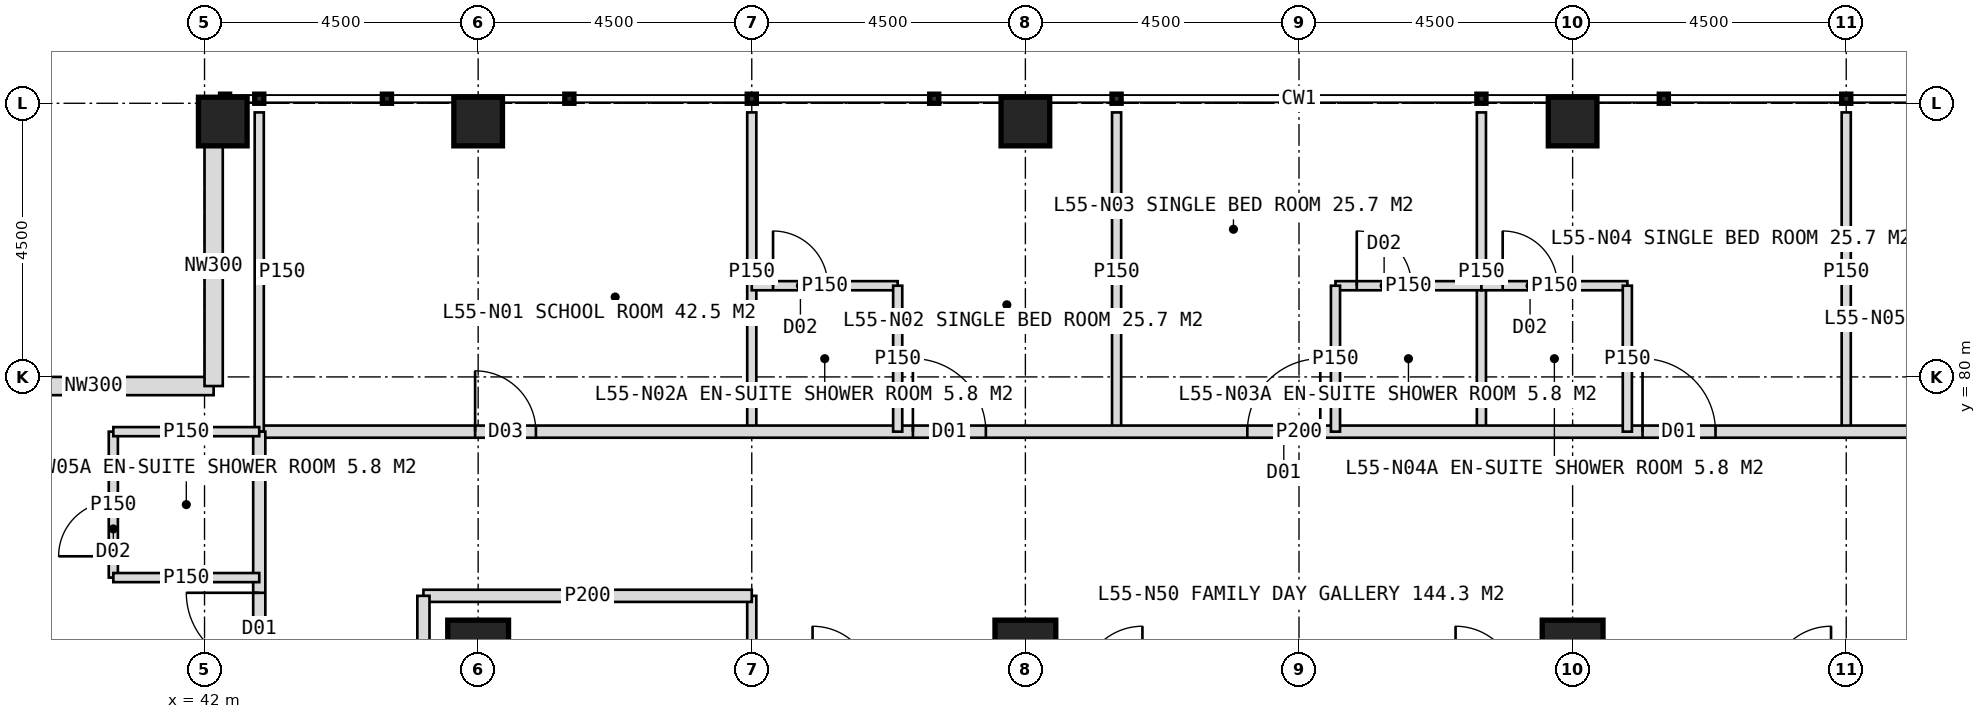
"""IFC4 building model, lengths in metres.
Left out: names, types, materials, properties, quantities, classifications, styles, units other than length and angle.
Written with IfcOpenShell. Run it as: python <this file> out.ifc"""

import sys

from ifc_helpers import new_model, si_unit, direction, frame, frame_2d, origin, origin_2d, place, context, subcontext, project, spatial, rectangle, hollow_rectangle, extrude, element, fill, save


model = new_model("IFC4")
c1 = context("Model", 3, precision=1e-05, world=origin(), true_north=direction((0.0, 1.0)))
c2 = subcontext(c1, "Body", "Model", "MODEL_VIEW")
j1 = project(units=[si_unit("LENGTHUNIT", "METRE"), si_unit("PLANEANGLEUNIT", "RADIAN")], contexts=[c1])
p1 = place(None, origin())
s1 = spatial("IfcSite", under=j1, at=p1, CompositionType="ELEMENT")
p2 = place(p1, origin())
s2 = spatial("IfcBuilding", under=s1, at=p2, CompositionType="ELEMENT")
p3 = place(p2, frame((0.0, 0.0, 229.0)))
s3 = spatial("IfcBuildingStorey", under=s2, at=p3, CompositionType="ELEMENT", Elevation=229.0)
for number, where, z_axis, x_axis in (
    (1, (46.5, 75.5, 0.0), (0.0, 0.0, 1.0), (1.0, 0.0, 0.0)),
    (2, (55.5, 75.5, 0.0), (0.0, 0.0, 1.0), (1.0, 0.0, 0.0)),
    (3, (64.5, 75.5, 0.0), (0.0, 0.0, 1.0), (1.0, 0.0, 0.0)),
):
    element("IfcColumn", number, at=place(p3, frame(where, z_axis=z_axis, x_axis=x_axis)), inside=s3, PredefinedType="COLUMN", context=c2, shape_type="SweptSolid", body=[
        extrude(hollow_rectangle(XDim=1.0, YDim=1.0, WallThickness=0.1, at=origin_2d()), origin(), (0.0, 0.0, 1.0), 4.0),
    ])
for number, where, z_axis, x_axis in (
    (4, (42.3, 84.2, 0.0), (0.0, 0.0, 1.0), (1.0, 0.0, 0.0)),
    (5, (46.5, 84.2, 0.0), (0.0, 0.0, 1.0), (1.0, 0.0, 0.0)),
    (6, (55.5, 84.2, 0.0), (0.0, 0.0, 1.0), (1.0, 0.0, 0.0)),
    (7, (64.5, 84.2, 0.0), (0.0, 0.0, 1.0), (1.0, 0.0, 0.0)),
):
    element("IfcColumn", number, at=place(p3, frame(where, z_axis=z_axis, x_axis=x_axis)), inside=s3, PredefinedType="COLUMN", context=c2, shape_type="SweptSolid", body=[
        extrude(hollow_rectangle(XDim=0.8, YDim=0.8, WallThickness=0.08, at=origin_2d()), origin(), (0.0, 0.0, 1.0), 4.0),
    ])
for number, where, z_axis, x_axis in (
    (8, (38.2, 79.85, 0.0), (0.0, 0.0, 1.0), (1.0, 0.0, 0.0)),
    (9, (42.15, 79.85, 0.0), (0.0, 0.0, 1.0), (0.0, 1.0, 0.0)),
):
    element("IfcWall", number, at=place(p3, frame(where, z_axis=z_axis, x_axis=x_axis)), inside=s3, PredefinedType="ELEMENTEDWALL", context=c2, shape_type="SweptSolid", body=[
        extrude(rectangle(XDim=3.95, YDim=0.3, at=frame_2d((1.975, 0.0))), origin(), (0.0, 0.0, 1.0), 2.85),
    ])
for number, where, z_axis, x_axis in (
    (10, (51.0, 79.1, 0.0), (0.0, 0.0, 1.0), (0.0, 1.0, 0.0)),
    (11, (57.0, 79.1, 0.0), (0.0, 0.0, 1.0), (0.0, 1.0, 0.0)),
    (12, (63.0, 79.1, 0.0), (0.0, 0.0, 1.0), (0.0, 1.0, 0.0)),
    (13, (69.0, 79.1, 0.0), (0.0, 0.0, 1.0), (0.0, 1.0, 0.0)),
):
    element("IfcWall", number, at=place(p3, frame(where, z_axis=z_axis, x_axis=x_axis)), inside=s3, PredefinedType="PARTITIONING", context=c2, shape_type="SweptSolid", body=[
        extrude(rectangle(XDim=5.25, YDim=0.15, at=frame_2d((2.625, 0.0))), origin(), (0.0, 0.0, 1.0), 3.75),
    ])
p4 = place(p3, frame((42.9, 79.1, 0.0), z_axis=(0.0, 0.0, 1.0), x_axis=(1.0, 0.0, 0.0)))
e14 = element("IfcWall", 14, at=p4, inside=s3, PredefinedType="PARTITIONING", context=c2, shape_type="SweptSolid", body=[
    extrude(rectangle(XDim=34.2, YDim=0.2, at=frame_2d((17.1, 0.0))), origin(), (0.0, 0.0, 1.0), 3.75),
])
p5 = place(p4, frame((3.55, 0.0, 0.0)))
e15 = element("IfcOpeningElement", 15, at=p5, cuts=e14, PredefinedType="OPENING", context=c2, shape_type="SweptSolid", body=[
    extrude(rectangle(XDim=1.0, YDim=2.1, at=frame_2d((0.5, 1.05))), frame((0.0, 0.11, 0.0), z_axis=(0.0, -1.0, 0.0), x_axis=(1.0, 0.0, 0.0)), (0.0, 0.0, 1.0), 0.22),
])
p6 = place(p4, frame((10.75, 0.0, 0.0)))
e16 = element("IfcOpeningElement", 16, at=p6, cuts=e14, PredefinedType="OPENING", context=c2, shape_type="SweptSolid", body=[
    extrude(rectangle(XDim=1.2, YDim=2.2, at=frame_2d((0.6, 1.1))), frame((0.0, 0.11, 0.0), z_axis=(0.0, -1.0, 0.0), x_axis=(1.0, 0.0, 0.0)), (0.0, 0.0, 1.0), 0.22),
])
p7 = place(p4, frame((16.25, 0.0, 0.0)))
e17 = element("IfcOpeningElement", 17, at=p7, cuts=e14, PredefinedType="OPENING", context=c2, shape_type="SweptSolid", body=[
    extrude(rectangle(XDim=1.2, YDim=2.2, at=frame_2d((0.6, 1.1))), frame((0.0, 0.11, 0.0), z_axis=(0.0, -1.0, 0.0), x_axis=(1.0, 0.0, 0.0)), (0.0, 0.0, 1.0), 0.22),
])
p8 = place(p4, frame((22.75, 0.0, 0.0)))
e18 = element("IfcOpeningElement", 18, at=p8, cuts=e14, PredefinedType="OPENING", context=c2, shape_type="SweptSolid", body=[
    extrude(rectangle(XDim=1.2, YDim=2.2, at=frame_2d((0.6, 1.1))), frame((0.0, 0.11, 0.0), z_axis=(0.0, -1.0, 0.0), x_axis=(1.0, 0.0, 0.0)), (0.0, 0.0, 1.0), 0.22),
])
p9 = place(p4, frame((29.75, 0.0, 0.0)))
e19 = element("IfcOpeningElement", 19, at=p9, cuts=e14, PredefinedType="OPENING", context=c2, shape_type="SweptSolid", body=[
    extrude(rectangle(XDim=1.2, YDim=2.2, at=frame_2d((0.6, 1.1))), frame((0.0, 0.11, 0.0), z_axis=(0.0, -1.0, 0.0), x_axis=(1.0, 0.0, 0.0)), (0.0, 0.0, 1.0), 0.22),
])
p10 = place(p3, frame((42.9, 79.1, 0.0), z_axis=(0.0, 0.0, 1.0), x_axis=(0.0, 1.0, 0.0)))
e20 = element("IfcWall", 20, at=p10, inside=s3, PredefinedType="PARTITIONING", context=c2, shape_type="SweptSolid", body=[
    extrude(rectangle(XDim=5.25, YDim=0.15, at=frame_2d((2.625, 0.0))), origin(), (0.0, 0.0, 1.0), 3.75),
])
p11 = place(p3, frame((51.0, 81.5, 0.0), z_axis=(0.0, 0.0, 1.0), x_axis=(1.0, 0.0, 0.0)))
e21 = element("IfcWall", 21, at=p11, inside=s3, PredefinedType="PARTITIONING", context=c2, shape_type="SweptSolid", body=[
    extrude(rectangle(XDim=2.4, YDim=0.15, at=frame_2d((1.2, 0.0))), origin(), (0.0, 0.0, 1.0), 3.75),
])
p12 = place(p11, frame((0.35, 0.0, 0.0)))
e22 = element("IfcOpeningElement", 22, at=p12, cuts=e21, PredefinedType="OPENING", context=c2, shape_type="SweptSolid", body=[
    extrude(rectangle(XDim=0.9, YDim=2.1, at=frame_2d((0.45, 1.05))), frame((0.0, 0.085, 0.0), z_axis=(0.0, -1.0, 0.0), x_axis=(1.0, 0.0, 0.0)), (0.0, 0.0, 1.0), 0.17),
])
p13 = place(p3, frame((53.4, 79.1, 0.0), z_axis=(0.0, 0.0, 1.0), x_axis=(0.0, 1.0, 0.0)))
e23 = element("IfcWall", 23, at=p13, inside=s3, PredefinedType="PARTITIONING", context=c2, shape_type="SweptSolid", body=[
    extrude(rectangle(XDim=2.4, YDim=0.15, at=frame_2d((1.2, 0.0))), origin(), (0.0, 0.0, 1.0), 3.75),
])
p14 = place(p3, frame((60.6, 81.5, 0.0), z_axis=(0.0, 0.0, 1.0), x_axis=(1.0, 0.0, 0.0)))
e24 = element("IfcWall", 24, at=p14, inside=s3, PredefinedType="PARTITIONING", context=c2, shape_type="SweptSolid", body=[
    extrude(rectangle(XDim=2.4, YDim=0.15, at=frame_2d((1.2, 0.0))), origin(), (0.0, 0.0, 1.0), 3.75),
])
p15 = place(p14, frame((0.35, 0.0, 0.0)))
e25 = element("IfcOpeningElement", 25, at=p15, cuts=e24, PredefinedType="OPENING", context=c2, shape_type="SweptSolid", body=[
    extrude(rectangle(XDim=0.9, YDim=2.1, at=frame_2d((0.45, 1.05))), frame((0.0, 0.085, 0.0), z_axis=(0.0, -1.0, 0.0), x_axis=(1.0, 0.0, 0.0)), (0.0, 0.0, 1.0), 0.17),
])
p16 = place(p3, frame((60.6, 79.1, 0.0), z_axis=(0.0, 0.0, 1.0), x_axis=(0.0, 1.0, 0.0)))
e26 = element("IfcWall", 26, at=p16, inside=s3, PredefinedType="PARTITIONING", context=c2, shape_type="SweptSolid", body=[
    extrude(rectangle(XDim=2.4, YDim=0.15, at=frame_2d((1.2, 0.0))), origin(), (0.0, 0.0, 1.0), 3.75),
])
p17 = place(p3, frame((63.0, 81.5, 0.0), z_axis=(0.0, 0.0, 1.0), x_axis=(1.0, 0.0, 0.0)))
e27 = element("IfcWall", 27, at=p17, inside=s3, PredefinedType="PARTITIONING", context=c2, shape_type="SweptSolid", body=[
    extrude(rectangle(XDim=2.4, YDim=0.15, at=frame_2d((1.2, 0.0))), origin(), (0.0, 0.0, 1.0), 3.75),
])
p18 = place(p17, frame((0.35, 0.0, 0.0)))
e28 = element("IfcOpeningElement", 28, at=p18, cuts=e27, PredefinedType="OPENING", context=c2, shape_type="SweptSolid", body=[
    extrude(rectangle(XDim=0.9, YDim=2.1, at=frame_2d((0.45, 1.05))), frame((0.0, 0.085, 0.0), z_axis=(0.0, -1.0, 0.0), x_axis=(1.0, 0.0, 0.0)), (0.0, 0.0, 1.0), 0.17),
])
p19 = place(p3, frame((65.4, 79.1, 0.0), z_axis=(0.0, 0.0, 1.0), x_axis=(0.0, 1.0, 0.0)))
e29 = element("IfcWall", 29, at=p19, inside=s3, PredefinedType="PARTITIONING", context=c2, shape_type="SweptSolid", body=[
    extrude(rectangle(XDim=2.4, YDim=0.15, at=frame_2d((1.2, 0.0))), origin(), (0.0, 0.0, 1.0), 3.75),
])
p20 = place(p3, frame((51.0, 71.0, 0.0), z_axis=(0.0, 0.0, 1.0), x_axis=(0.0, 1.0, 0.0)))
e30 = element("IfcWall", 30, at=p20, inside=s3, PredefinedType="PARTITIONING", context=c2, shape_type="SweptSolid", body=[
    extrude(rectangle(XDim=5.4, YDim=0.15, at=frame_2d((2.7, 0.0))), origin(), (0.0, 0.0, 1.0), 3.75),
])
p21 = place(p3, frame((45.6, 76.4, 0.0), z_axis=(0.0, 0.0, 1.0), x_axis=(1.0, 0.0, 0.0)))
e31 = element("IfcWall", 31, at=p21, inside=s3, PredefinedType="PARTITIONING", context=c2, shape_type="SweptSolid", body=[
    extrude(rectangle(XDim=5.4, YDim=0.2, at=frame_2d((2.7, 0.0))), origin(), (0.0, 0.0, 1.0), 3.75),
])
p22 = place(p3, frame((42.9, 44.9, 0.0), z_axis=(0.0, 0.0, 1.0), x_axis=(0.0, 1.0, 0.0)))
e32 = element("IfcWall", 32, at=p22, inside=s3, PredefinedType="PARTITIONING", context=c2, shape_type="SweptSolid", body=[
    extrude(rectangle(XDim=34.2, YDim=0.2, at=frame_2d((17.1, 0.0))), origin(), (0.0, 0.0, 1.0), 3.75),
])
p23 = place(p22, frame((1.25, 0.0, 0.0)))
e33 = element("IfcOpeningElement", 33, at=p23, cuts=e32, PredefinedType="OPENING", context=c2, shape_type="SweptSolid", body=[
    extrude(rectangle(XDim=1.2, YDim=2.2, at=frame_2d((0.6, 1.1))), frame((0.0, 0.11, 0.0), z_axis=(0.0, -1.0, 0.0), x_axis=(1.0, 0.0, 0.0)), (0.0, 0.0, 1.0), 0.22),
])
p24 = place(p22, frame((7.75, 0.0, 0.0)))
e34 = element("IfcOpeningElement", 34, at=p24, cuts=e32, PredefinedType="OPENING", context=c2, shape_type="SweptSolid", body=[
    extrude(rectangle(XDim=1.2, YDim=2.2, at=frame_2d((0.6, 1.1))), frame((0.0, 0.11, 0.0), z_axis=(0.0, -1.0, 0.0), x_axis=(1.0, 0.0, 0.0)), (0.0, 0.0, 1.0), 0.22),
])
p25 = place(p22, frame((13.6, 0.0, 0.0)))
e35 = element("IfcOpeningElement", 35, at=p25, cuts=e32, PredefinedType="OPENING", context=c2, shape_type="SweptSolid", body=[
    extrude(rectangle(XDim=1.0, YDim=2.1, at=frame_2d((0.5, 1.05))), frame((0.0, 0.11, 0.0), z_axis=(0.0, -1.0, 0.0), x_axis=(1.0, 0.0, 0.0)), (0.0, 0.0, 1.0), 0.22),
])
p26 = place(p22, frame((19.75, 0.0, 0.0)))
e36 = element("IfcOpeningElement", 36, at=p26, cuts=e32, PredefinedType="OPENING", context=c2, shape_type="SweptSolid", body=[
    extrude(rectangle(XDim=1.2, YDim=2.2, at=frame_2d((0.6, 1.1))), frame((0.0, 0.11, 0.0), z_axis=(0.0, -1.0, 0.0), x_axis=(1.0, 0.0, 0.0)), (0.0, 0.0, 1.0), 0.22),
])
p27 = place(p22, frame((30.35, 0.0, 0.0)))
e37 = element("IfcOpeningElement", 37, at=p27, cuts=e32, PredefinedType="OPENING", context=c2, shape_type="SweptSolid", body=[
    extrude(rectangle(XDim=1.2, YDim=2.2, at=frame_2d((0.6, 1.1))), frame((0.0, 0.11, 0.0), z_axis=(0.0, -1.0, 0.0), x_axis=(1.0, 0.0, 0.0)), (0.0, 0.0, 1.0), 0.22),
])
p28 = place(p3, frame((40.5, 76.7, 0.0), z_axis=(0.0, 0.0, 1.0), x_axis=(0.0, 1.0, 0.0)))
e38 = element("IfcWall", 38, at=p28, inside=s3, PredefinedType="PARTITIONING", context=c2, shape_type="SweptSolid", body=[
    extrude(rectangle(XDim=2.4, YDim=0.15, at=frame_2d((1.2, 0.0))), origin(), (0.0, 0.0, 1.0), 3.75),
])
p29 = place(p28, frame((0.35, 0.0, 0.0)))
e39 = element("IfcOpeningElement", 39, at=p29, cuts=e38, PredefinedType="OPENING", context=c2, shape_type="SweptSolid", body=[
    extrude(rectangle(XDim=0.9, YDim=2.1, at=frame_2d((0.45, 1.05))), frame((0.0, 0.085, 0.0), z_axis=(0.0, -1.0, 0.0), x_axis=(1.0, 0.0, 0.0)), (0.0, 0.0, 1.0), 0.17),
])
for number, where, z_axis, x_axis in (
    (40, (42.9, 76.7, 0.0), (0.0, 0.0, 1.0), (-1.0, 0.0, 0.0)),
    (41, (42.9, 79.1, 0.0), (0.0, 0.0, 1.0), (-1.0, 0.0, 0.0)),
):
    element("IfcWall", number, at=place(p3, frame(where, z_axis=z_axis, x_axis=x_axis)), inside=s3, PredefinedType="PARTITIONING", context=c2, shape_type="SweptSolid", body=[
        extrude(rectangle(XDim=2.4, YDim=0.15, at=frame_2d((1.2, 0.0))), origin(), (0.0, 0.0, 1.0), 3.75),
    ])
p30 = place(p3, frame((45.6, 62.0, 0.0), z_axis=(0.0, 0.0, 1.0), x_axis=(0.0, 1.0, 0.0)))
e42 = element("IfcWall", 42, at=p30, inside=s3, PredefinedType="PARTITIONING", context=c2, shape_type="SweptSolid", body=[
    extrude(rectangle(XDim=14.4, YDim=0.2, at=frame_2d((7.2, 0.0))), origin(), (0.0, 0.0, 1.0), 3.75),
])
p31 = place(p30, frame((2.5, 0.0, 0.0)))
e43 = element("IfcOpeningElement", 43, at=p31, cuts=e42, PredefinedType="OPENING", context=c2, shape_type="SweptSolid", body=[
    extrude(rectangle(XDim=1.0, YDim=2.1, at=frame_2d((0.5, 1.05))), frame((0.0, 0.11, 0.0), z_axis=(0.0, -1.0, 0.0), x_axis=(1.0, 0.0, 0.0)), (0.0, 0.0, 1.0), 0.22),
])
p32 = place(p30, frame((7.0, 0.0, 0.0)))
e44 = element("IfcOpeningElement", 44, at=p32, cuts=e42, PredefinedType="OPENING", context=c2, shape_type="SweptSolid", body=[
    extrude(rectangle(XDim=1.0, YDim=2.1, at=frame_2d((0.5, 1.05))), frame((0.0, 0.11, 0.0), z_axis=(0.0, -1.0, 0.0), x_axis=(1.0, 0.0, 0.0)), (0.0, 0.0, 1.0), 0.22),
])
p33 = place(p30, frame((11.2, 0.0, 0.0)))
e45 = element("IfcOpeningElement", 45, at=p33, cuts=e42, PredefinedType="OPENING", context=c2, shape_type="SweptSolid", body=[
    extrude(rectangle(XDim=1.0, YDim=2.1, at=frame_2d((0.5, 1.05))), frame((0.0, 0.11, 0.0), z_axis=(0.0, -1.0, 0.0), x_axis=(1.0, 0.0, 0.0)), (0.0, 0.0, 1.0), 0.22),
])
p34 = place(p5, origin())
e46 = element("IfcDoor", 46, at=p34, inside=s3, OperationType="SINGLE_SWING_LEFT", PredefinedType="DOOR", context=c2, shape_type="SweptSolid", body=[
    extrude(rectangle(XDim=1.0, YDim=2.1, at=frame_2d((0.5, 1.05))), frame((0.0, 0.025, 0.0), z_axis=(0.0, -1.0, 0.0), x_axis=(1.0, 0.0, 0.0)), (0.0, 0.0, 1.0), 0.05),
])
fill(e15, e46)
p35 = place(p6, origin())
e47 = element("IfcDoor", 47, at=p35, inside=s3, OperationType="SINGLE_SWING_LEFT", PredefinedType="DOOR", context=c2, shape_type="SweptSolid", body=[
    extrude(rectangle(XDim=1.2, YDim=2.2, at=frame_2d((0.6, 1.1))), frame((0.0, 0.025, 0.0), z_axis=(0.0, -1.0, 0.0), x_axis=(1.0, 0.0, 0.0)), (0.0, 0.0, 1.0), 0.05),
])
fill(e16, e47)
p36 = place(p12, origin())
e48 = element("IfcDoor", 48, at=p36, inside=s3, OperationType="SINGLE_SWING_LEFT", PredefinedType="DOOR", context=c2, shape_type="SweptSolid", body=[
    extrude(rectangle(XDim=0.9, YDim=2.1, at=frame_2d((0.45, 1.05))), frame((0.0, 0.025, 0.0), z_axis=(0.0, -1.0, 0.0), x_axis=(1.0, 0.0, 0.0)), (0.0, 0.0, 1.0), 0.05),
])
fill(e22, e48)
p37 = place(p7, origin())
e49 = element("IfcDoor", 49, at=p37, inside=s3, OperationType="SINGLE_SWING_RIGHT", PredefinedType="DOOR", context=c2, shape_type="SweptSolid", body=[
    extrude(rectangle(XDim=1.2, YDim=2.2, at=frame_2d((0.6, 1.1))), frame((0.0, 0.025, 0.0), z_axis=(0.0, -1.0, 0.0), x_axis=(1.0, 0.0, 0.0)), (0.0, 0.0, 1.0), 0.05),
])
fill(e17, e49)
p38 = place(p15, origin())
e50 = element("IfcDoor", 50, at=p38, inside=s3, OperationType="SINGLE_SWING_LEFT", PredefinedType="DOOR", context=c2, shape_type="SweptSolid", body=[
    extrude(rectangle(XDim=0.9, YDim=2.1, at=frame_2d((0.45, 1.05))), frame((0.0, 0.025, 0.0), z_axis=(0.0, -1.0, 0.0), x_axis=(1.0, 0.0, 0.0)), (0.0, 0.0, 1.0), 0.05),
])
fill(e25, e50)
p39 = place(p8, origin())
e51 = element("IfcDoor", 51, at=p39, inside=s3, OperationType="SINGLE_SWING_LEFT", PredefinedType="DOOR", context=c2, shape_type="SweptSolid", body=[
    extrude(rectangle(XDim=1.2, YDim=2.2, at=frame_2d((0.6, 1.1))), frame((0.0, 0.025, 0.0), z_axis=(0.0, -1.0, 0.0), x_axis=(1.0, 0.0, 0.0)), (0.0, 0.0, 1.0), 0.05),
])
fill(e18, e51)
p40 = place(p18, origin())
e52 = element("IfcDoor", 52, at=p40, inside=s3, OperationType="SINGLE_SWING_LEFT", PredefinedType="DOOR", context=c2, shape_type="SweptSolid", body=[
    extrude(rectangle(XDim=0.9, YDim=2.1, at=frame_2d((0.45, 1.05))), frame((0.0, 0.025, 0.0), z_axis=(0.0, -1.0, 0.0), x_axis=(1.0, 0.0, 0.0)), (0.0, 0.0, 1.0), 0.05),
])
fill(e28, e52)
p41 = place(p27, origin())
e53 = element("IfcDoor", 53, at=p41, inside=s3, OperationType="SINGLE_SWING_RIGHT", PredefinedType="DOOR", context=c2, shape_type="SweptSolid", body=[
    extrude(rectangle(XDim=1.2, YDim=2.2, at=frame_2d((0.6, 1.1))), frame((0.0, 0.025, 0.0), z_axis=(0.0, -1.0, 0.0), x_axis=(1.0, 0.0, 0.0)), (0.0, 0.0, 1.0), 0.05),
])
fill(e37, e53)
p42 = place(p29, origin())
e54 = element("IfcDoor", 54, at=p42, inside=s3, OperationType="SINGLE_SWING_LEFT", PredefinedType="DOOR", context=c2, shape_type="SweptSolid", body=[
    extrude(rectangle(XDim=0.9, YDim=2.1, at=frame_2d((0.45, 1.05))), frame((0.0, 0.025, 0.0), z_axis=(0.0, -1.0, 0.0), x_axis=(1.0, 0.0, 0.0)), (0.0, 0.0, 1.0), 0.05),
])
fill(e39, e54)
save(model, sys.argv[1])
